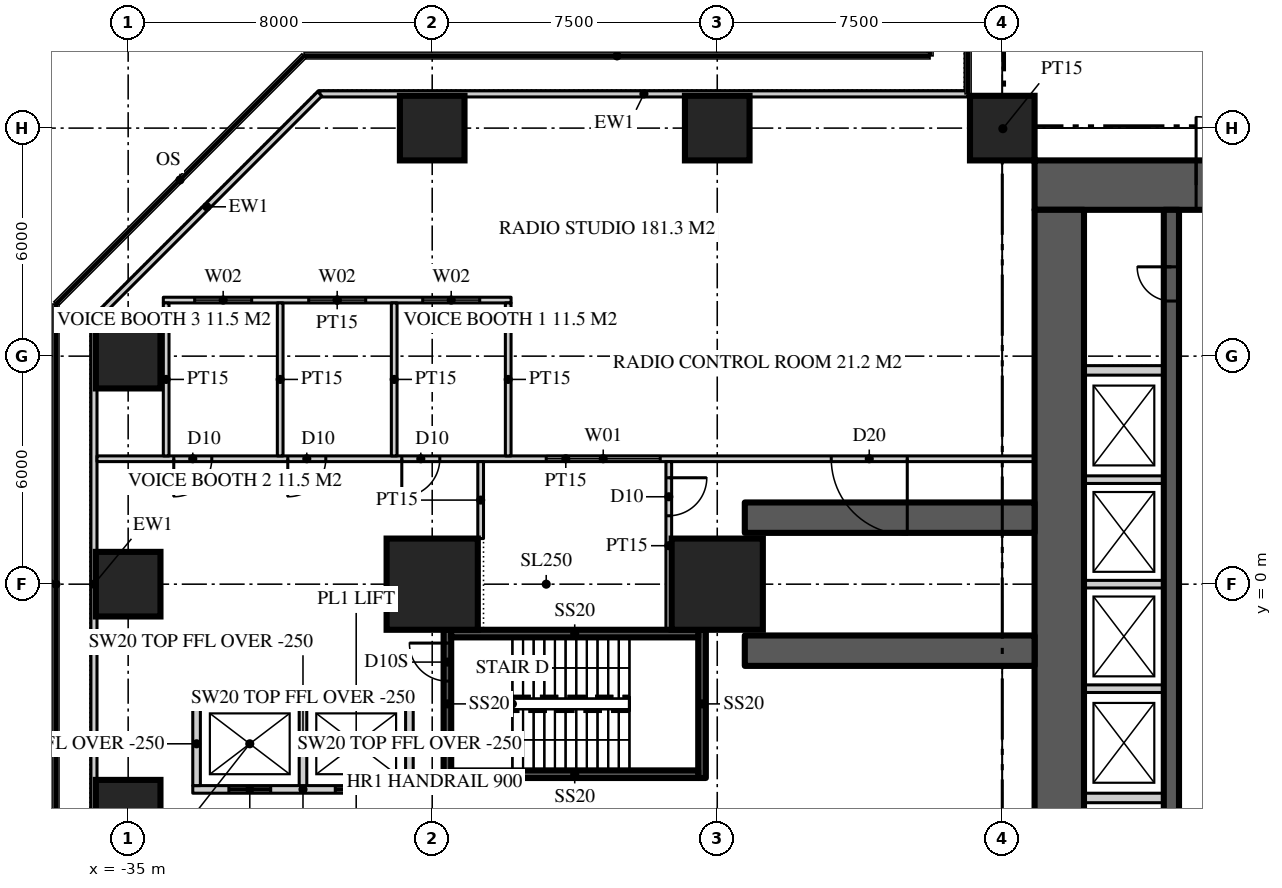
"""IFC4 building model, lengths in metres.
Left out: names, types, materials, properties, quantities, classifications, styles, units other than length and angle.
Written with IfcOpenShell. Run it as: python <this file> out.ifc"""

import sys

from ifc_helpers import new_model, si_unit, direction, frame, frame_2d, origin, origin_2d, place, context, subcontext, project, spatial, rectangle, extrude, element, fill, save


model = new_model("IFC4")
c1 = context("Model", 3, precision=1e-05, world=origin(), true_north=direction((0.0, 1.0)))
c2 = subcontext(c1, "Body", "Model", "MODEL_VIEW")
j1 = project(units=[si_unit("LENGTHUNIT", "METRE"), si_unit("PLANEANGLEUNIT", "RADIAN")], contexts=[c1])
p1 = place(None, origin())
s1 = spatial("IfcSite", under=j1, at=p1, CompositionType="ELEMENT")
p2 = place(p1, origin())
s2 = spatial("IfcBuilding", under=s1, at=p2, CompositionType="ELEMENT")
p3 = place(p2, frame((0.0, 0.0, 15.0)))
s3 = spatial("IfcBuildingStorey", under=s2, at=p3, CompositionType="ELEMENT", Elevation=15.0)
p4 = place(p3, frame((-11.15, 10.5, 0.0), z_axis=(0.0, 0.0, 1.0), x_axis=(1.0, 0.0, 0.0)))
e1 = element("IfcWall", 1, at=p4, inside=s3, PredefinedType="SHEAR", context=c2, shape_type="SweptSolid", body=[
    extrude(rectangle(XDim=22.3, YDim=1.3, at=frame_2d((11.15, 0.0))), origin(), (0.0, 0.0, 1.0), 8.0),
])
p5 = place(p4, frame((4.25, 0.0, 0.0)))
e2 = element("IfcOpeningElement", 2, at=p5, cuts=e1, PredefinedType="OPENING", context=c2, shape_type="SweptSolid", body=[
    extrude(rectangle(XDim=1.8, YDim=2.2, at=frame_2d((0.9, 1.1))), frame((0.0, 0.66, 0.0), z_axis=(0.0, -1.0, 0.0), x_axis=(1.0, 0.0, 0.0)), (0.0, 0.0, 1.0), 1.32),
])
p6 = place(p4, frame((16.25, 0.0, 0.0)))
e3 = element("IfcOpeningElement", 3, at=p6, cuts=e1, PredefinedType="OPENING", context=c2, shape_type="SweptSolid", body=[
    extrude(rectangle(XDim=1.8, YDim=2.2, at=frame_2d((0.9, 1.1))), frame((0.0, 0.66, 0.0), z_axis=(0.0, -1.0, 0.0), x_axis=(1.0, 0.0, 0.0)), (0.0, 0.0, 1.0), 1.32),
])
p7 = place(p3, frame((-10.5, 9.85, 0.0), z_axis=(0.0, 0.0, 1.0), x_axis=(0.0, -1.0, 0.0)))
e4 = element("IfcWall", 4, at=p7, inside=s3, PredefinedType="SHEAR", context=c2, shape_type="SweptSolid", body=[
    extrude(rectangle(XDim=19.7, YDim=1.3, at=frame_2d((9.85, 0.0))), origin(), (0.0, 0.0, 1.0), 8.0),
])
p8 = place(p7, frame((17.25, 0.0, 0.0)))
e5 = element("IfcOpeningElement", 5, at=p8, cuts=e4, PredefinedType="OPENING", context=c2, shape_type="SweptSolid", body=[
    extrude(rectangle(XDim=1.0, YDim=2.2, at=frame_2d((0.5, 1.1))), frame((0.0, 0.66, 0.0), z_axis=(0.0, -1.0, 0.0), x_axis=(1.0, 0.0, 0.0)), (0.0, 0.0, 1.0), 1.32),
])
for number, where, z_axis, x_axis in (
    (6, (-11.15, 1.75, 0.0), (0.0, 0.0, 1.0), (-1.0, 0.0, 0.0)),
    (7, (-11.15, -1.75, 0.0), (0.0, 0.0, 1.0), (-1.0, 0.0, 0.0)),
):
    element("IfcWall", number, at=place(p3, frame(where, z_axis=z_axis, x_axis=x_axis)), inside=s3, PredefinedType="SHEAR", context=c2, shape_type="SweptSolid", body=[
        extrude(rectangle(XDim=7.625, YDim=0.8, at=frame_2d((3.812, 0.0))), origin(), (0.0, 0.0, 1.0), 8.0),
    ])
for number, where, z_axis, x_axis in (
    (8, (-35.0, -6.0, 0.0), (0.0, 0.0, 1.0), (1.0, 0.0, 0.0)),
    (9, (-35.0, 0.0, 0.0), (0.0, 0.0, 1.0), (1.0, 0.0, 0.0)),
):
    element("IfcColumn", number, at=place(p3, frame(where, z_axis=z_axis, x_axis=x_axis)), inside=s3, PredefinedType="COLUMN", context=c2, shape_type="SweptSolid", body=[
        extrude(rectangle(XDim=1.7, YDim=1.7, at=origin_2d()), origin(), (0.0, 0.0, 1.0), 8.0),
    ])
for number, where, z_axis, x_axis in (
    (10, (-27.0, 0.0, 0.0), (0.0, 0.0, 1.0), (1.0, 0.0, 0.0)),
    (11, (-19.5, 0.0, 0.0), (0.0, 0.0, 1.0), (1.0, 0.0, 0.0)),
):
    element("IfcColumn", number, at=place(p3, frame(where, z_axis=z_axis, x_axis=x_axis)), inside=s3, PredefinedType="COLUMN", context=c2, shape_type="SweptSolid", body=[
        extrude(rectangle(XDim=2.4, YDim=2.4, at=origin_2d()), origin(), (0.0, 0.0, 1.0), 8.0),
    ])
for number, where, z_axis, x_axis in (
    (12, (-35.0, 6.0, 0.0), (0.0, 0.0, 1.0), (1.0, 0.0, 0.0)),
    (13, (-27.0, 12.0, 0.0), (0.0, 0.0, 1.0), (1.0, 0.0, 0.0)),
    (14, (-19.5, 12.0, 0.0), (0.0, 0.0, 1.0), (1.0, 0.0, 0.0)),
    (15, (-12.0, 12.0, 0.0), (0.0, 0.0, 1.0), (1.0, 0.0, 0.0)),
):
    element("IfcColumn", number, at=place(p3, frame(where, z_axis=z_axis, x_axis=x_axis)), inside=s3, PredefinedType="COLUMN", context=c2, shape_type="SweptSolid", body=[
        extrude(rectangle(XDim=1.7, YDim=1.7, at=origin_2d()), origin(), (0.0, 0.0, 1.0), 8.0),
    ])
p9 = place(p3, frame((-12.9, 12.9, 0.0), z_axis=(0.0, 0.0, 1.0), x_axis=(-1.0, 0.0, 0.0)))
e16 = element("IfcWall", 16, at=p9, inside=s3, PredefinedType="SOLIDWALL", context=c2, shape_type="SweptSolid", body=[
    extrude(rectangle(XDim=17.059, YDim=0.16, at=frame_2d((8.529, 0.0))), origin(), (0.0, 0.0, 1.0), 7.75),
])
p10 = place(p3, frame((-29.958, 12.9, 0.0), z_axis=(0.0, 0.0, 1.0), x_axis=(-0.707106781187, -0.707106781187, 0.0)))
e17 = element("IfcWall", 17, at=p10, inside=s3, PredefinedType="SOLIDWALL", context=c2, shape_type="SweptSolid", body=[
    extrude(rectangle(XDim=8.402, YDim=0.16, at=frame_2d((4.201, 0.0))), origin(), (0.0, 0.0, 1.0), 7.75),
])
p11 = place(p3, frame((-35.9, 6.958, 0.0), z_axis=(0.0, 0.0, 1.0), x_axis=(0.0, -1.0, 0.0)))
e18 = element("IfcWall", 18, at=p11, inside=s3, PredefinedType="SOLIDWALL", context=c2, shape_type="SweptSolid", body=[
    extrude(rectangle(XDim=13.917, YDim=0.16, at=frame_2d((6.958, 0.0))), origin(), (0.0, 0.0, 1.0), 7.75),
])
p12 = place(p3, frame((-7.55, -9.85, 0.0), z_axis=(0.0, 0.0, 1.0), x_axis=(0.0, 1.0, 0.0)))
e19 = element("IfcWall", 19, at=p12, inside=s3, PredefinedType="SHEAR", context=c2, shape_type="SweptSolid", body=[
    extrude(rectangle(XDim=19.7, YDim=0.4, at=frame_2d((9.85, 0.0))), origin(), (0.0, 0.0, 1.0), 8.0),
])
p13 = place(p12, frame((1.45, 0.0, 0.0)))
e20 = element("IfcOpeningElement", 20, at=p13, cuts=e19, PredefinedType="OPENING", context=c2, shape_type="SweptSolid", body=[
    extrude(rectangle(XDim=1.0, YDim=2.2, at=frame_2d((0.5, 1.1))), frame((0.0, 0.21, 0.0), z_axis=(0.0, -1.0, 0.0), x_axis=(1.0, 0.0, 0.0)), (0.0, 0.0, 1.0), 0.42),
])
p14 = place(p12, frame((17.3, 0.0, 0.0)))
e21 = element("IfcOpeningElement", 21, at=p14, cuts=e19, PredefinedType="OPENING", context=c2, shape_type="SweptSolid", body=[
    extrude(rectangle(XDim=0.9, YDim=2.1, at=frame_2d((0.45, 1.05))), frame((0.0, 0.21, 0.0), z_axis=(0.0, -1.0, 0.0), x_axis=(1.0, 0.0, 0.0)), (0.0, 0.0, 1.0), 0.42),
])
for number, where, z_axis, x_axis in (
    (22, (-9.85, 5.625, 0.0), (0.0, 0.0, 1.0), (1.0, 0.0, 0.0)),
    (23, (-9.85, -5.625, 0.0), (0.0, 0.0, 1.0), (1.0, 0.0, 0.0)),
):
    element("IfcWall", number, at=place(p3, frame(where, z_axis=z_axis, x_axis=x_axis)), inside=s3, PredefinedType="SOLIDWALL", context=c2, shape_type="SweptSolid", body=[
        extrude(rectangle(XDim=2.1, YDim=0.25, at=frame_2d((1.05, 0.0))), origin(), (0.0, 0.0, 1.0), 7.8),
    ])
for number, where, z_axis, x_axis in (
    (24, (-9.85, -2.75, 0.0), (0.0, 0.0, 1.0), (1.0, 0.0, 0.0)),
    (25, (-9.85, 0.0, 0.0), (0.0, 0.0, 1.0), (1.0, 0.0, 0.0)),
    (26, (-9.85, 2.75, 0.0), (0.0, 0.0, 1.0), (1.0, 0.0, 0.0)),
):
    element("IfcWall", number, at=place(p3, frame(where, z_axis=z_axis, x_axis=x_axis)), inside=s3, PredefinedType="SOLIDWALL", context=c2, shape_type="SweptSolid", body=[
        extrude(rectangle(XDim=2.1, YDim=0.2, at=frame_2d((1.05, 0.0))), origin(), (0.0, 0.0, 1.0), 7.8),
    ])
p15 = place(p3, frame((-11.15, 3.3, 0.0), z_axis=(0.0, 0.0, 1.0), x_axis=(-1.0, 0.0, 0.0)))
e27 = element("IfcWall", 27, at=p15, inside=s3, PredefinedType="PARTITIONING", context=c2, shape_type="SweptSolid", body=[
    extrude(rectangle(XDim=24.67, YDim=0.15, at=frame_2d((12.335, 0.0))), origin(), (0.0, 0.0, 1.0), 7.75),
])
p16 = place(p15, frame((3.35, 0.0, 0.0)))
e28 = element("IfcOpeningElement", 28, at=p16, cuts=e27, PredefinedType="OPENING", context=c2, shape_type="SweptSolid", body=[
    extrude(rectangle(XDim=2.0, YDim=2.6, at=frame_2d((1.0, 1.3))), frame((0.0, 0.085, 0.0), z_axis=(0.0, -1.0, 0.0), x_axis=(1.0, 0.0, 0.0)), (0.0, 0.0, 1.0), 0.17),
])
p17 = place(p15, frame((15.65, 0.0, 0.0)))
e29 = element("IfcOpeningElement", 29, at=p17, cuts=e27, PredefinedType="OPENING", context=c2, shape_type="SweptSolid", body=[
    extrude(rectangle(XDim=1.0, YDim=2.2, at=frame_2d((0.5, 1.1))), frame((0.0, 0.085, 0.0), z_axis=(0.0, -1.0, 0.0), x_axis=(1.0, 0.0, 0.0)), (0.0, 0.0, 1.0), 0.17),
])
p18 = place(p15, frame((18.65, 0.0, 0.0)))
e30 = element("IfcOpeningElement", 30, at=p18, cuts=e27, PredefinedType="OPENING", context=c2, shape_type="SweptSolid", body=[
    extrude(rectangle(XDim=1.0, YDim=2.2, at=frame_2d((0.5, 1.1))), frame((0.0, 0.085, 0.0), z_axis=(0.0, -1.0, 0.0), x_axis=(1.0, 0.0, 0.0)), (0.0, 0.0, 1.0), 0.17),
])
p19 = place(p15, frame((21.65, 0.0, 0.0)))
e31 = element("IfcOpeningElement", 31, at=p19, cuts=e27, PredefinedType="OPENING", context=c2, shape_type="SweptSolid", body=[
    extrude(rectangle(XDim=1.0, YDim=2.2, at=frame_2d((0.5, 1.1))), frame((0.0, 0.085, 0.0), z_axis=(0.0, -1.0, 0.0), x_axis=(1.0, 0.0, 0.0)), (0.0, 0.0, 1.0), 0.17),
])
p20 = place(p15, frame((9.85, 0.0, 0.9)))
e32 = element("IfcOpeningElement", 32, at=p20, cuts=e27, PredefinedType="OPENING", context=c2, shape_type="SweptSolid", body=[
    extrude(rectangle(XDim=3.0, YDim=1.5, at=frame_2d((1.5, 0.75))), frame((0.0, 0.085, 0.0), z_axis=(0.0, -1.0, 0.0), x_axis=(1.0, 0.0, 0.0)), (0.0, 0.0, 1.0), 0.17),
])
p21 = place(p3, frame((-20.775, 3.225, 0.0), z_axis=(0.0, 0.0, 1.0), x_axis=(0.0, -1.0, 0.0)))
e33 = element("IfcWall", 33, at=p21, inside=s3, PredefinedType="PARTITIONING", context=c2, shape_type="SweptSolid", body=[
    extrude(rectangle(XDim=4.425, YDim=0.15, at=frame_2d((2.212, 0.0))), origin(), (0.0, 0.0, 1.0), 7.75),
])
p22 = place(p21, frame((0.425, 0.0, 0.0)))
e34 = element("IfcOpeningElement", 34, at=p22, cuts=e33, PredefinedType="OPENING", context=c2, shape_type="SweptSolid", body=[
    extrude(rectangle(XDim=1.0, YDim=2.2, at=frame_2d((0.5, 1.1))), frame((0.0, 0.085, 0.0), z_axis=(0.0, -1.0, 0.0), x_axis=(1.0, 0.0, 0.0)), (0.0, 0.0, 1.0), 0.17),
])
p23 = place(p3, frame((-25.725, 3.225, 0.0), z_axis=(0.0, 0.0, 1.0), x_axis=(0.0, -1.0, 0.0)))
e35 = element("IfcWall", 35, at=p23, inside=s3, PredefinedType="PARTITIONING", context=c2, shape_type="SweptSolid", body=[
    extrude(rectangle(XDim=2.025, YDim=0.15, at=frame_2d((1.013, 0.0))), origin(), (0.0, 0.0, 1.0), 7.75),
])
p24 = place(p3, frame((-24.925, 7.475, 0.0), z_axis=(0.0, 0.0, 1.0), x_axis=(-1.0, 0.0, 0.0)))
e36 = element("IfcWall", 36, at=p24, inside=s3, PredefinedType="PARTITIONING", context=c2, shape_type="SweptSolid", body=[
    extrude(rectangle(XDim=9.15, YDim=0.15, at=frame_2d((4.575, 0.0))), origin(), (0.0, 0.0, 1.0), 7.75),
])
p25 = place(p24, frame((0.825, 0.0, 0.9)))
e37 = element("IfcOpeningElement", 37, at=p25, cuts=e36, PredefinedType="OPENING", context=c2, shape_type="SweptSolid", body=[
    extrude(rectangle(XDim=1.5, YDim=1.2, at=frame_2d((0.75, 0.6))), frame((0.0, 0.085, 0.0), z_axis=(0.0, -1.0, 0.0), x_axis=(1.0, 0.0, 0.0)), (0.0, 0.0, 1.0), 0.17),
])
p26 = place(p24, frame((3.825, 0.0, 0.9)))
e38 = element("IfcOpeningElement", 38, at=p26, cuts=e36, PredefinedType="OPENING", context=c2, shape_type="SweptSolid", body=[
    extrude(rectangle(XDim=1.5, YDim=1.2, at=frame_2d((0.75, 0.6))), frame((0.0, 0.085, 0.0), z_axis=(0.0, -1.0, 0.0), x_axis=(1.0, 0.0, 0.0)), (0.0, 0.0, 1.0), 0.17),
])
p27 = place(p24, frame((6.825, 0.0, 0.9)))
e39 = element("IfcOpeningElement", 39, at=p27, cuts=e36, PredefinedType="OPENING", context=c2, shape_type="SweptSolid", body=[
    extrude(rectangle(XDim=1.5, YDim=1.2, at=frame_2d((0.75, 0.6))), frame((0.0, 0.085, 0.0), z_axis=(0.0, -1.0, 0.0), x_axis=(1.0, 0.0, 0.0)), (0.0, 0.0, 1.0), 0.17),
])
for number, where, z_axis, x_axis in (
    (40, (-25.0, 3.375, 0.0), (0.0, 0.0, 1.0), (0.0, 1.0, 0.0)),
    (41, (-28.0, 3.375, 0.0), (0.0, 0.0, 1.0), (0.0, 1.0, 0.0)),
    (42, (-31.0, 3.375, 0.0), (0.0, 0.0, 1.0), (0.0, 1.0, 0.0)),
    (43, (-34.0, 3.375, 0.0), (0.0, 0.0, 1.0), (0.0, 1.0, 0.0)),
):
    element("IfcWall", number, at=place(p3, frame(where, z_axis=z_axis, x_axis=x_axis)), inside=s3, PredefinedType="PARTITIONING", context=c2, shape_type="SweptSolid", body=[
        extrude(rectangle(XDim=4.025, YDim=0.15, at=frame_2d((2.012, 0.0))), origin(), (0.0, 0.0, 1.0), 7.75),
    ])
p28 = place(p3, frame((-11.15, 11.15, 0.0), z_axis=(0.0, 0.0, 1.0), x_axis=(-0.707106781187, 0.707106781187, 0.0)))
e44 = element("IfcWall", 44, at=p28, inside=s3, PredefinedType="PARTITIONING", context=c2, shape_type="SweptSolid", body=[
    extrude(rectangle(XDim=2.362, YDim=0.15, at=frame_2d((1.181, 0.0))), origin(), (0.0, 0.0, 1.0), 7.75),
])
p29 = place(p3, frame((-27.5, -3.0, 0.0), z_axis=(0.0, 0.0, 1.0), x_axis=(-1.0, 0.0, 0.0)))
e45 = element("IfcWall", 45, at=p29, inside=s3, PredefinedType="SOLIDWALL", context=c2, shape_type="SweptSolid", body=[
    extrude(rectangle(XDim=5.8, YDim=0.2, at=frame_2d((2.9, 0.0))), origin(), (0.0, 0.0, 1.0), 7.75),
])
p30 = place(p3, frame((-33.3, -5.4, 0.0), z_axis=(0.0, 0.0, 1.0), x_axis=(1.0, 0.0, 0.0)))
e46 = element("IfcWall", 46, at=p30, inside=s3, PredefinedType="SOLIDWALL", context=c2, shape_type="SweptSolid", body=[
    extrude(rectangle(XDim=5.8, YDim=0.2, at=frame_2d((2.9, 0.0))), origin(), (0.0, 0.0, 1.0), 7.75),
])
p31 = place(p30, frame((3.75, 0.0, 0.0)))
e47 = element("IfcOpeningElement", 47, at=p31, cuts=e46, PredefinedType="OPENING", context=c2, shape_type="SweptSolid", body=[
    extrude(rectangle(XDim=1.1, YDim=2.2, at=frame_2d((0.55, 1.1))), frame((0.0, 0.11, 0.0), z_axis=(0.0, -1.0, 0.0), x_axis=(1.0, 0.0, 0.0)), (0.0, 0.0, 1.0), 0.22),
])
p32 = place(p30, frame((0.95, 0.0, 0.0)))
e48 = element("IfcOpeningElement", 48, at=p32, cuts=e46, PredefinedType="OPENING", context=c2, shape_type="SweptSolid", body=[
    extrude(rectangle(XDim=1.1, YDim=2.2, at=frame_2d((0.55, 1.1))), frame((0.0, 0.11, 0.0), z_axis=(0.0, -1.0, 0.0), x_axis=(1.0, 0.0, 0.0)), (0.0, 0.0, 1.0), 0.22),
])
for number, where, z_axis, x_axis in (
    (49, (-27.6, -3.1, 0.0), (0.0, 0.0, 1.0), (0.0, -1.0, 0.0)),
    (50, (-30.4, -3.1, 0.0), (0.0, 0.0, 1.0), (0.0, -1.0, 0.0)),
    (51, (-33.2, -3.1, 0.0), (0.0, 0.0, 1.0), (0.0, -1.0, 0.0)),
):
    element("IfcWall", number, at=place(p3, frame(where, z_axis=z_axis, x_axis=x_axis)), inside=s3, PredefinedType="SOLIDWALL", context=c2, shape_type="SweptSolid", body=[
        extrude(rectangle(XDim=2.2, YDim=0.2, at=frame_2d((1.1, 0.0))), origin(), (0.0, 0.0, 1.0), 7.75),
    ])
p33 = place(p3, frame((-19.9, -1.2, 0.0), z_axis=(0.0, 0.0, 1.0), x_axis=(0.0, -1.0, 0.0)))
e52 = element("IfcWall", 52, at=p33, inside=s3, PredefinedType="SOLIDWALL", context=c2, shape_type="SweptSolid", body=[
    extrude(rectangle(XDim=3.9, YDim=0.2, at=frame_2d((1.95, 0.0))), origin(), (0.0, 0.0, 1.0), 7.75),
])
p34 = place(p3, frame((-26.6, -5.1, 0.0), z_axis=(0.0, 0.0, 1.0), x_axis=(0.0, 1.0, 0.0)))
e53 = element("IfcWall", 53, at=p34, inside=s3, PredefinedType="SOLIDWALL", context=c2, shape_type="SweptSolid", body=[
    extrude(rectangle(XDim=3.9, YDim=0.2, at=frame_2d((1.95, 0.0))), origin(), (0.0, 0.0, 1.0), 7.75),
])
p35 = place(p34, frame((2.55, 0.0, 0.0)))
e54 = element("IfcOpeningElement", 54, at=p35, cuts=e53, PredefinedType="OPENING", context=c2, shape_type="SweptSolid", body=[
    extrude(rectangle(XDim=1.0, YDim=2.2, at=frame_2d((0.5, 1.1))), frame((0.0, 0.11, 0.0), z_axis=(0.0, -1.0, 0.0), x_axis=(1.0, 0.0, 0.0)), (0.0, 0.0, 1.0), 0.22),
])
for number, where, z_axis, x_axis in (
    (55, (-20.0, -1.3, 0.0), (0.0, 0.0, 1.0), (-1.0, 0.0, 0.0)),
    (56, (-26.5, -5.0, 0.0), (0.0, 0.0, 1.0), (1.0, 0.0, 0.0)),
):
    element("IfcWall", number, at=place(p3, frame(where, z_axis=z_axis, x_axis=x_axis)), inside=s3, PredefinedType="SOLIDWALL", context=c2, shape_type="SweptSolid", body=[
        extrude(rectangle(XDim=6.5, YDim=0.2, at=frame_2d((3.25, 0.0))), origin(), (0.0, 0.0, 1.0), 7.75),
    ])
p36 = place(p31, origin())
e57 = element("IfcDoor", 57, at=p36, inside=s3, OperationType="SLIDING_TO_LEFT", PredefinedType="DOOR", context=c2, shape_type="SweptSolid", body=[
    extrude(rectangle(XDim=1.1, YDim=2.2, at=frame_2d((0.55, 1.1))), frame((0.0, 0.025, 0.0), z_axis=(0.0, -1.0, 0.0), x_axis=(1.0, 0.0, 0.0)), (0.0, 0.0, 1.0), 0.05),
])
fill(e47, e57)
p37 = place(p32, origin())
e58 = element("IfcDoor", 58, at=p37, inside=s3, OperationType="SLIDING_TO_LEFT", PredefinedType="DOOR", context=c2, shape_type="SweptSolid", body=[
    extrude(rectangle(XDim=1.1, YDim=2.2, at=frame_2d((0.55, 1.1))), frame((0.0, 0.025, 0.0), z_axis=(0.0, -1.0, 0.0), x_axis=(1.0, 0.0, 0.0)), (0.0, 0.0, 1.0), 0.05),
])
fill(e48, e58)
p38 = place(p5, origin())
e59 = element("IfcDoor", 59, at=p38, inside=s3, OperationType="DOUBLE_DOOR_DOUBLE_SWING", PredefinedType="DOOR", context=c2, shape_type="SweptSolid", body=[
    extrude(rectangle(XDim=1.8, YDim=2.2, at=frame_2d((0.9, 1.1))), frame((0.0, 0.025, 0.0), z_axis=(0.0, -1.0, 0.0), x_axis=(1.0, 0.0, 0.0)), (0.0, 0.0, 1.0), 0.05),
])
fill(e2, e59)
p39 = place(p14, origin())
e60 = element("IfcDoor", 60, at=p39, inside=s3, OperationType="SINGLE_SWING_RIGHT", PredefinedType="DOOR", context=c2, shape_type="SweptSolid", body=[
    extrude(rectangle(XDim=0.9, YDim=2.1, at=frame_2d((0.45, 1.05))), frame((0.0, 0.025, 0.0), z_axis=(0.0, -1.0, 0.0), x_axis=(1.0, 0.0, 0.0)), (0.0, 0.0, 1.0), 0.05),
])
fill(e21, e60)
p40 = place(p16, origin())
e61 = element("IfcDoor", 61, at=p40, inside=s3, OperationType="DOUBLE_DOOR_DOUBLE_SWING", PredefinedType="DOOR", context=c2, shape_type="SweptSolid", body=[
    extrude(rectangle(XDim=2.0, YDim=2.6, at=frame_2d((1.0, 1.3))), frame((0.0, 0.025, 0.0), z_axis=(0.0, -1.0, 0.0), x_axis=(1.0, 0.0, 0.0)), (0.0, 0.0, 1.0), 0.05),
])
fill(e28, e61)
p41 = place(p22, origin())
e62 = element("IfcDoor", 62, at=p41, inside=s3, OperationType="SINGLE_SWING_LEFT", PredefinedType="DOOR", context=c2, shape_type="SweptSolid", body=[
    extrude(rectangle(XDim=1.0, YDim=2.2, at=frame_2d((0.5, 1.1))), frame((0.0, 0.025, 0.0), z_axis=(0.0, -1.0, 0.0), x_axis=(1.0, 0.0, 0.0)), (0.0, 0.0, 1.0), 0.05),
])
fill(e34, e62)
p42 = place(p17, origin())
e63 = element("IfcDoor", 63, at=p42, inside=s3, OperationType="SINGLE_SWING_RIGHT", PredefinedType="DOOR", context=c2, shape_type="SweptSolid", body=[
    extrude(rectangle(XDim=1.0, YDim=2.2, at=frame_2d((0.5, 1.1))), frame((0.0, 0.025, 0.0), z_axis=(0.0, -1.0, 0.0), x_axis=(1.0, 0.0, 0.0)), (0.0, 0.0, 1.0), 0.05),
])
fill(e29, e63)
p43 = place(p18, origin())
e64 = element("IfcDoor", 64, at=p43, inside=s3, OperationType="SINGLE_SWING_RIGHT", PredefinedType="DOOR", context=c2, shape_type="SweptSolid", body=[
    extrude(rectangle(XDim=1.0, YDim=2.2, at=frame_2d((0.5, 1.1))), frame((0.0, 0.025, 0.0), z_axis=(0.0, -1.0, 0.0), x_axis=(1.0, 0.0, 0.0)), (0.0, 0.0, 1.0), 0.05),
])
fill(e30, e64)
p44 = place(p19, origin())
e65 = element("IfcDoor", 65, at=p44, inside=s3, OperationType="SINGLE_SWING_RIGHT", PredefinedType="DOOR", context=c2, shape_type="SweptSolid", body=[
    extrude(rectangle(XDim=1.0, YDim=2.2, at=frame_2d((0.5, 1.1))), frame((0.0, 0.025, 0.0), z_axis=(0.0, -1.0, 0.0), x_axis=(1.0, 0.0, 0.0)), (0.0, 0.0, 1.0), 0.05),
])
fill(e31, e65)
p45 = place(p35, origin())
e66 = element("IfcDoor", 66, at=p45, inside=s3, OperationType="SINGLE_SWING_RIGHT", PredefinedType="DOOR", context=c2, shape_type="SweptSolid", body=[
    extrude(rectangle(XDim=1.0, YDim=2.2, at=frame_2d((0.5, 1.1))), frame((0.0, 0.025, 0.0), z_axis=(0.0, -1.0, 0.0), x_axis=(1.0, 0.0, 0.0)), (0.0, 0.0, 1.0), 0.05),
])
fill(e54, e66)
p46 = place(p20, origin())
e67 = element("IfcWindow", 67, at=p46, inside=s3, PartitioningType="SINGLE_PANEL", PredefinedType="WINDOW", context=c2, shape_type="SweptSolid", body=[
    extrude(rectangle(XDim=3.0, YDim=1.5, at=frame_2d((1.5, 0.75))), frame((0.0, 0.03, 0.0), z_axis=(0.0, -1.0, 0.0), x_axis=(1.0, 0.0, 0.0)), (0.0, 0.0, 1.0), 0.06),
])
fill(e32, e67)
p47 = place(p25, origin())
e68 = element("IfcWindow", 68, at=p47, inside=s3, PartitioningType="SINGLE_PANEL", PredefinedType="WINDOW", context=c2, shape_type="SweptSolid", body=[
    extrude(rectangle(XDim=1.5, YDim=1.2, at=frame_2d((0.75, 0.6))), frame((0.0, 0.03, 0.0), z_axis=(0.0, -1.0, 0.0), x_axis=(1.0, 0.0, 0.0)), (0.0, 0.0, 1.0), 0.06),
])
fill(e37, e68)
p48 = place(p26, origin())
e69 = element("IfcWindow", 69, at=p48, inside=s3, PartitioningType="SINGLE_PANEL", PredefinedType="WINDOW", context=c2, shape_type="SweptSolid", body=[
    extrude(rectangle(XDim=1.5, YDim=1.2, at=frame_2d((0.75, 0.6))), frame((0.0, 0.03, 0.0), z_axis=(0.0, -1.0, 0.0), x_axis=(1.0, 0.0, 0.0)), (0.0, 0.0, 1.0), 0.06),
])
fill(e38, e69)
p49 = place(p27, origin())
e70 = element("IfcWindow", 70, at=p49, inside=s3, PartitioningType="SINGLE_PANEL", PredefinedType="WINDOW", context=c2, shape_type="SweptSolid", body=[
    extrude(rectangle(XDim=1.5, YDim=1.2, at=frame_2d((0.75, 0.6))), frame((0.0, 0.03, 0.0), z_axis=(0.0, -1.0, 0.0), x_axis=(1.0, 0.0, 0.0)), (0.0, 0.0, 1.0), 0.06),
])
fill(e39, e70)
save(model, sys.argv[1])
